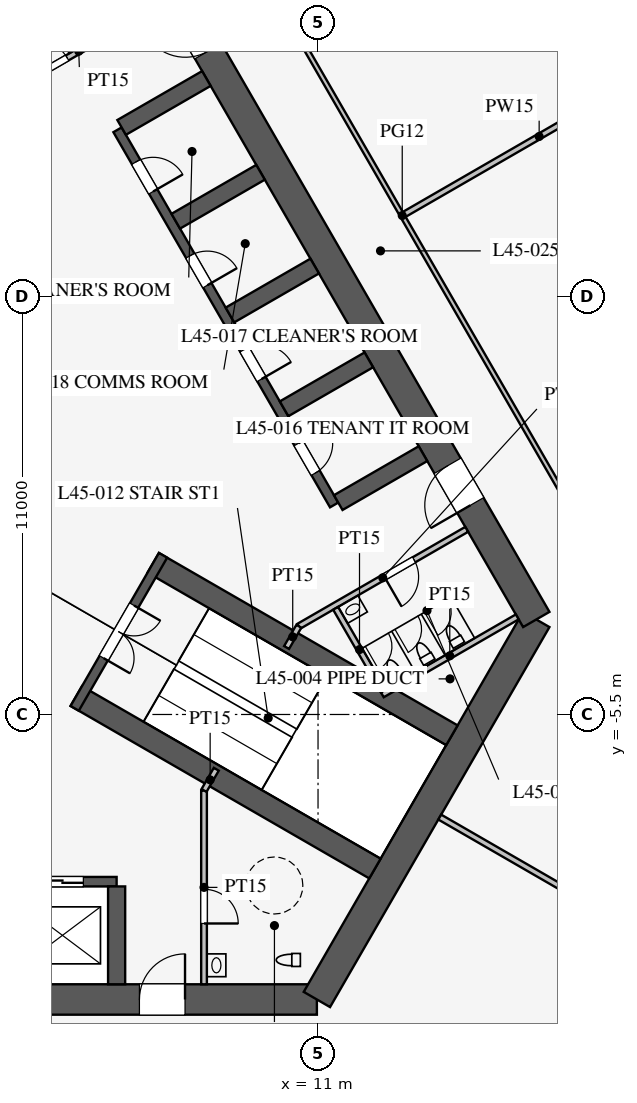
"""IFC4 building model, lengths in metres.
Left out: names, types, materials, properties, quantities, classifications, styles, units other than length and angle.
Written with IfcOpenShell. Run it as: python <this file> out.ifc"""

import sys

from ifc_helpers import new_model, si_unit, direction, frame, frame_2d, origin, place, context, subcontext, project, spatial, rectangle, extrude, element, fill, save


model = new_model("IFC4")
c1 = context("Model", 3, precision=1e-05, world=origin(), true_north=direction((0.0, 1.0)))
c2 = subcontext(c1, "Body", "Model", "MODEL_VIEW")
j1 = project(units=[si_unit("LENGTHUNIT", "METRE"), si_unit("PLANEANGLEUNIT", "RADIAN")], contexts=[c1])
p1 = place(None, origin())
s1 = spatial("IfcSite", under=j1, at=p1, CompositionType="ELEMENT")
p2 = place(p1, origin())
s2 = spatial("IfcBuilding", under=s1, at=p2, CompositionType="ELEMENT")
p3 = place(p2, frame((0.0, 0.0, 198.1)))
s3 = spatial("IfcBuildingStorey", under=s2, at=p3, CompositionType="ELEMENT", Elevation=198.1)
p4 = place(p3, frame((-10.97, -13.0, 0.0), z_axis=(0.0, 0.0, 1.0), x_axis=(1.0, 0.0, 0.0)))
e1 = element("IfcWall", 1, at=p4, inside=s3, PredefinedType="SHEAR", context=c2, shape_type="SweptSolid", body=[
    extrude(rectangle(XDim=21.939, YDim=0.8, at=frame_2d((10.97, 0.0))), origin(), (0.0, 0.0, 1.0), 4.2),
])
p5 = place(p4, frame((17.27, 0.0, 0.0)))
e2 = element("IfcOpeningElement", 2, at=p5, cuts=e1, PredefinedType="OPENING", context=c2, shape_type="SweptSolid", body=[
    extrude(rectangle(XDim=1.2, YDim=2.1, at=frame_2d((0.6, 1.05))), frame((0.0, 0.41, 0.0), z_axis=(0.0, -1.0, 0.0), x_axis=(1.0, 0.0, 0.0)), (0.0, 0.0, 1.0), 0.82),
])
p6 = place(p4, frame((3.47, 0.0, 0.0)))
e3 = element("IfcOpeningElement", 3, at=p6, cuts=e1, PredefinedType="OPENING", context=c2, shape_type="SweptSolid", body=[
    extrude(rectangle(XDim=1.2, YDim=2.1, at=frame_2d((0.6, 1.05))), frame((0.0, 0.41, 0.0), z_axis=(0.0, -1.0, 0.0), x_axis=(1.0, 0.0, 0.0)), (0.0, 0.0, 1.0), 0.82),
])
p7 = place(p3, frame((10.97, -13.0, 0.0), z_axis=(0.0, 0.0, 1.0), x_axis=(0.499995765644, 0.866027848477, 0.0)))
e4 = element("IfcWall", 4, at=p7, inside=s3, PredefinedType="SHEAR", context=c2, shape_type="SweptSolid", body=[
    extrude(rectangle(XDim=11.547, YDim=0.8, at=frame_2d((5.773, 0.0))), origin(), (0.0, 0.0, 1.0), 4.2),
])
p8 = place(p3, frame((16.743, -3.0, 0.0), z_axis=(0.0, 0.0, 1.0), x_axis=(-0.500002442456, 0.866023993627, 0.0)))
e5 = element("IfcWall", 5, at=p8, inside=s3, PredefinedType="SHEAR", context=c2, shape_type="SweptSolid", body=[
    extrude(rectangle(XDim=21.939, YDim=0.8, at=frame_2d((10.97, 0.0))), origin(), (0.0, 0.0, 1.0), 4.2),
])
p9 = place(p8, frame((17.27, 0.0, 0.0)))
e6 = element("IfcOpeningElement", 6, at=p9, cuts=e5, PredefinedType="OPENING", context=c2, shape_type="SweptSolid", body=[
    extrude(rectangle(XDim=1.2, YDim=2.1, at=frame_2d((0.6, 1.05))), frame((0.0, 0.41, 0.0), z_axis=(0.0, -1.0, 0.0), x_axis=(1.0, 0.0, 0.0)), (0.0, 0.0, 1.0), 0.82),
])
p10 = place(p8, frame((3.47, 0.0, 0.0)))
e7 = element("IfcOpeningElement", 7, at=p10, cuts=e5, PredefinedType="OPENING", context=c2, shape_type="SweptSolid", body=[
    extrude(rectangle(XDim=1.2, YDim=2.1, at=frame_2d((0.6, 1.05))), frame((0.0, 0.41, 0.0), z_axis=(0.0, -1.0, 0.0), x_axis=(1.0, 0.0, 0.0)), (0.0, 0.0, 1.0), 0.82),
])
p11 = place(p3, frame((-5.7, -9.9, 0.0), z_axis=(0.0, 0.0, 1.0), x_axis=(1.0, 0.0, 0.0)))
e8 = element("IfcWall", 8, at=p11, inside=s3, PredefinedType="SHEAR", context=c2, shape_type="SweptSolid", body=[
    extrude(rectangle(XDim=11.4, YDim=0.25, at=frame_2d((5.7, 0.0))), origin(), (0.0, 0.0, 1.0), 4.2),
])
p12 = place(p11, frame((0.875, 0.0, 0.0)))
e9 = element("IfcOpeningElement", 9, at=p12, cuts=e8, PredefinedType="OPENING", context=c2, shape_type="SweptSolid", body=[
    extrude(rectangle(XDim=1.1, YDim=2.2, at=frame_2d((0.55, 1.1))), frame((0.0, 0.135, 0.0), z_axis=(0.0, -1.0, 0.0), x_axis=(1.0, 0.0, 0.0)), (0.0, 0.0, 1.0), 0.27),
])
p13 = place(p11, frame((3.725, 0.0, 0.0)))
e10 = element("IfcOpeningElement", 10, at=p13, cuts=e8, PredefinedType="OPENING", context=c2, shape_type="SweptSolid", body=[
    extrude(rectangle(XDim=1.1, YDim=2.2, at=frame_2d((0.55, 1.1))), frame((0.0, 0.135, 0.0), z_axis=(0.0, -1.0, 0.0), x_axis=(1.0, 0.0, 0.0)), (0.0, 0.0, 1.0), 0.27),
])
p14 = place(p11, frame((6.575, 0.0, 0.0)))
e11 = element("IfcOpeningElement", 11, at=p14, cuts=e8, PredefinedType="OPENING", context=c2, shape_type="SweptSolid", body=[
    extrude(rectangle(XDim=1.1, YDim=2.2, at=frame_2d((0.55, 1.1))), frame((0.0, 0.135, 0.0), z_axis=(0.0, -1.0, 0.0), x_axis=(1.0, 0.0, 0.0)), (0.0, 0.0, 1.0), 0.27),
])
p15 = place(p11, frame((9.425, 0.0, 0.0)))
e12 = element("IfcOpeningElement", 12, at=p15, cuts=e8, PredefinedType="OPENING", context=c2, shape_type="SweptSolid", body=[
    extrude(rectangle(XDim=1.1, YDim=2.2, at=frame_2d((0.55, 1.1))), frame((0.0, 0.135, 0.0), z_axis=(0.0, -1.0, 0.0), x_axis=(1.0, 0.0, 0.0)), (0.0, 0.0, 1.0), 0.27),
])
p16 = place(p3, frame((5.7, -10.025, 0.0), z_axis=(0.0, 0.0, 1.0), x_axis=(0.0, -1.0, 0.0)))
e13 = element("IfcWall", 13, at=p16, inside=s3, PredefinedType="SHEAR", context=c2, shape_type="SweptSolid", body=[
    extrude(rectangle(XDim=2.575, YDim=0.45, at=frame_2d((1.288, 0.0))), origin(), (0.0, 0.0, 1.0), 4.2),
])
p17 = place(p3, frame((11.424, 0.014, 0.0), z_axis=(0.0, 0.0, 1.0), x_axis=(-0.500001763848, 0.866024385424, 0.0)))
e14 = element("IfcWall", 14, at=p17, inside=s3, PredefinedType="SHEAR", context=c2, shape_type="SweptSolid", body=[
    extrude(rectangle(XDim=11.4, YDim=0.25, at=frame_2d((5.7, 0.0))), origin(), (0.0, 0.0, 1.0), 4.2),
])
p18 = place(p17, frame((0.975, 0.0, 0.0)))
e15 = element("IfcOpeningElement", 15, at=p18, cuts=e14, PredefinedType="OPENING", context=c2, shape_type="SweptSolid", body=[
    extrude(rectangle(XDim=0.9, YDim=2.1, at=frame_2d((0.45, 1.05))), frame((0.0, 0.135, 0.0), z_axis=(0.0, -1.0, 0.0), x_axis=(1.0, 0.0, 0.0)), (0.0, 0.0, 1.0), 0.27),
])
p19 = place(p17, frame((3.825, 0.0, 0.0)))
e16 = element("IfcOpeningElement", 16, at=p19, cuts=e14, PredefinedType="OPENING", context=c2, shape_type="SweptSolid", body=[
    extrude(rectangle(XDim=0.9, YDim=2.1, at=frame_2d((0.45, 1.05))), frame((0.0, 0.135, 0.0), z_axis=(0.0, -1.0, 0.0), x_axis=(1.0, 0.0, 0.0)), (0.0, 0.0, 1.0), 0.27),
])
p20 = place(p17, frame((6.675, 0.0, 0.0)))
e17 = element("IfcOpeningElement", 17, at=p20, cuts=e14, PredefinedType="OPENING", context=c2, shape_type="SweptSolid", body=[
    extrude(rectangle(XDim=0.9, YDim=2.1, at=frame_2d((0.45, 1.05))), frame((0.0, 0.135, 0.0), z_axis=(0.0, -1.0, 0.0), x_axis=(1.0, 0.0, 0.0)), (0.0, 0.0, 1.0), 0.27),
])
p21 = place(p17, frame((9.525, 0.0, 0.0)))
e18 = element("IfcOpeningElement", 18, at=p21, cuts=e14, PredefinedType="OPENING", context=c2, shape_type="SweptSolid", body=[
    extrude(rectangle(XDim=0.9, YDim=2.1, at=frame_2d((0.45, 1.05))), frame((0.0, 0.135, 0.0), z_axis=(0.0, -1.0, 0.0), x_axis=(1.0, 0.0, 0.0)), (0.0, 0.0, 1.0), 0.27),
])
for number, where, z_axis, x_axis in (
    (19, (11.532, 0.076, 0.0), (0.0, 0.0, 1.0), (0.866, 0.5, 0.0)),
    (20, (10.107, 2.544, 0.0), (0.0, 0.0, 1.0), (0.866, 0.5, 0.0)),
    (21, (8.682, 5.012, 0.0), (0.0, 0.0, 1.0), (0.866, 0.5, 0.0)),
    (22, (7.257, 7.481, 0.0), (0.0, 0.0, 1.0), (0.866, 0.5, 0.0)),
):
    element("IfcWall", number, at=place(p3, frame(where, z_axis=z_axis, x_axis=x_axis)), inside=s3, PredefinedType="SHEAR", context=c2, shape_type="SweptSolid", body=[
        extrude(rectangle(XDim=2.575, YDim=0.45, at=frame_2d((1.288, 0.0))), origin(), (0.0, 0.0, 1.0), 4.2),
    ])
p22 = place(p3, frame((5.832, 9.949, 0.0), z_axis=(0.0, 0.0, 1.0), x_axis=(0.866029291668, 0.499993265928, 0.0)))
e23 = element("IfcWall", 23, at=p22, inside=s3, PredefinedType="SHEAR", context=c2, shape_type="SweptSolid", body=[
    extrude(rectangle(XDim=2.575, YDim=0.45, at=frame_2d((1.288, 0.0))), origin(), (0.0, 0.0, 1.0), 4.2),
])
for number, where, z_axis, x_axis in (
    (24, (4.638, -5.016, 0.0), (0.0, 0.0, 1.0), (0.866, -0.5, 0.0)),
    (25, (6.663, -1.509, 0.0), (0.0, 0.0, 1.0), (0.866, -0.5, 0.0)),
):
    element("IfcWall", number, at=place(p3, frame(where, z_axis=z_axis, x_axis=x_axis)), inside=s3, PredefinedType="SHEAR", context=c2, shape_type="SweptSolid", body=[
        extrude(rectangle(XDim=9.075, YDim=0.6, at=frame_2d((4.538, 0.0))), origin(), (0.0, 0.0, 1.0), 4.2),
    ])
p23 = place(p3, frame((4.597, -5.339, 0.0), z_axis=(0.0, 0.0, 1.0), x_axis=(0.499984536904, 0.866034331223, 0.0)))
e26 = element("IfcWall", 26, at=p23, inside=s3, PredefinedType="SHEAR", context=c2, shape_type="SweptSolid", body=[
    extrude(rectangle(XDim=4.65, YDim=0.25, at=frame_2d((2.325, 0.0))), origin(), (0.0, 0.0, 1.0), 4.2),
])
p24 = place(p23, frame((1.525, 0.0, 0.0)))
e27 = element("IfcOpeningElement", 27, at=p24, cuts=e26, PredefinedType="OPENING", context=c2, shape_type="SweptSolid", body=[
    extrude(rectangle(XDim=1.6, YDim=2.1, at=frame_2d((0.8, 1.05))), frame((0.0, 0.135, 0.0), z_axis=(0.0, -1.0, 0.0), x_axis=(1.0, 0.0, 0.0)), (0.0, 0.0, 1.0), 0.27),
])
p25 = place(p3, frame((8.0, -7.5, 0.0), z_axis=(0.0, 0.0, 1.0), x_axis=(0.0, -1.0, 0.0)))
e28 = element("IfcWall", 28, at=p25, inside=s3, PredefinedType="PARTITIONING", context=c2, shape_type="SweptSolid", body=[
    extrude(rectangle(XDim=5.1, YDim=0.15, at=frame_2d((2.55, 0.0))), origin(), (0.0, 0.0, 1.0), 4.0),
])
p26 = place(p25, frame((2.6, 0.0, 0.0)))
e29 = element("IfcOpeningElement", 29, at=p26, cuts=e28, PredefinedType="OPENING", context=c2, shape_type="SweptSolid", body=[
    extrude(rectangle(XDim=0.9, YDim=2.1, at=frame_2d((0.45, 1.05))), frame((0.0, 0.085, 0.0), z_axis=(0.0, -1.0, 0.0), x_axis=(1.0, 0.0, 0.0)), (0.0, 0.0, 1.0), 0.17),
])
p27 = place(p3, frame((2.495, 10.678, 0.0), z_axis=(0.0, 0.0, 1.0), x_axis=(0.86602216432, 0.500005610874, 0.0)))
e30 = element("IfcWall", 30, at=p27, inside=s3, PredefinedType="PARTITIONING", context=c2, shape_type="SweptSolid", body=[
    extrude(rectangle(XDim=5.1, YDim=0.15, at=frame_2d((2.55, 0.0))), origin(), (0.0, 0.0, 1.0), 4.0),
])
p28 = place(p27, frame((1.3, 0.0, 0.0)))
e31 = element("IfcOpeningElement", 31, at=p28, cuts=e30, PredefinedType="OPENING", context=c2, shape_type="SweptSolid", body=[
    extrude(rectangle(XDim=0.9, YDim=2.1, at=frame_2d((0.45, 1.05))), frame((0.0, 0.085, 0.0), z_axis=(0.0, -1.0, 0.0), x_axis=(1.0, 0.0, 0.0)), (0.0, 0.0, 1.0), 0.17),
])
p29 = place(p3, frame((10.495, -3.178, 0.0), z_axis=(0.0, 0.0, 1.0), x_axis=(0.86602216432, 0.500005610874, 0.0)))
e32 = element("IfcWall", 32, at=p29, inside=s3, PredefinedType="PARTITIONING", context=c2, shape_type="SweptSolid", body=[
    extrude(rectangle(XDim=5.1, YDim=0.15, at=frame_2d((2.55, 0.0))), origin(), (0.0, 0.0, 1.0), 4.0),
])
p30 = place(p29, frame((2.6, 0.0, 0.0)))
e33 = element("IfcOpeningElement", 33, at=p30, cuts=e32, PredefinedType="OPENING", context=c2, shape_type="SweptSolid", body=[
    extrude(rectangle(XDim=0.9, YDim=2.1, at=frame_2d((0.45, 1.05))), frame((0.0, 0.085, 0.0), z_axis=(0.0, -1.0, 0.0), x_axis=(1.0, 0.0, 0.0)), (0.0, 0.0, 1.0), 0.17),
])
for number, where, z_axis, x_axis in (
    (34, (8.0, -7.5, 0.0), (0.0, 0.0, 1.0), (0.5, 0.866, 0.0)),
    (35, (10.495, -3.178, 0.0), (0.0, 0.0, 1.0), (-0.5, -0.866, 0.0)),
):
    element("IfcWall", number, at=place(p3, frame(where, z_axis=z_axis, x_axis=x_axis)), inside=s3, PredefinedType="PARTITIONING", context=c2, shape_type="SweptSolid", body=[
        extrude(rectangle(XDim=0.645, YDim=0.15, at=frame_2d((0.323, 0.0))), origin(), (0.0, 0.0, 1.0), 4.0),
    ])
p31 = place(p3, frame((12.691, -4.982, 0.0), z_axis=(0.0, 0.0, 1.0), x_axis=(0.8660249478, 0.500000789788, 0.0)))
e36 = element("IfcWall", 36, at=p31, inside=s3, PredefinedType="PARTITIONING", context=c2, shape_type="SweptSolid", body=[
    extrude(rectangle(XDim=4.1, YDim=0.15, at=frame_2d((2.05, 0.0))), origin(), (0.0, 0.0, 1.0), 4.0),
])
p32 = place(p3, frame((11.464, -2.706, 0.0), z_axis=(0.0, 0.0, 1.0), x_axis=(0.50001992892, -0.866013897511, 0.0)))
e37 = element("IfcWall", 37, at=p32, inside=s3, PredefinedType="PARTITIONING", context=c2, shape_type="SweptSolid", body=[
    extrude(rectangle(XDim=2.51, YDim=0.15, at=frame_2d((1.255, 0.0))), origin(), (0.0, 0.0, 1.0), 4.0),
])
p33 = place(p3, frame((14.203, -8.2, 0.0), z_axis=(0.0, 0.0, 1.0), x_axis=(0.866021600284, -0.500006587798, 0.0)))
e38 = element("IfcWall", 38, at=p33, inside=s3, PredefinedType="PARTITIONING", context=c2, shape_type="SweptSolid", body=[
    extrude(rectangle(XDim=14.95, YDim=0.15, at=frame_2d((7.475, 0.0))), origin(), (0.0, 0.0, 1.0), 2.4),
])
p34 = place(p3, frame((13.268, 7.66, 0.0), z_axis=(0.0, 0.0, 1.0), x_axis=(0.866019499219, 0.500010226868, 0.0)))
e39 = element("IfcWall", 39, at=p34, inside=s3, PredefinedType="PARTITIONING", context=c2, shape_type="SweptSolid", body=[
    extrude(rectangle(XDim=8.2, YDim=0.15, at=frame_2d((4.1, 0.0))), origin(), (0.0, 0.0, 1.0), 2.992),
])
p35 = place(p3, frame((26.415, -15.231, 0.0), z_axis=(0.0, 0.0, 1.0), x_axis=(-0.50000091641, 0.866024874695, 0.0)))
e40 = element("IfcWall", 40, at=p35, inside=s3, PredefinedType="PARTITIONING", context=c2, shape_type="SweptSolid", body=[
    extrude(rectangle(XDim=52.796, YDim=0.12, at=frame_2d((26.398, 0.0))), origin(), (0.0, 0.0, 1.0), 2.9),
])
p36 = place(p35, frame((10.2, 0.0, 0.15)))
e41 = element("IfcOpeningElement", 41, at=p36, cuts=e40, PredefinedType="OPENING", context=c2, shape_type="SweptSolid", body=[
    extrude(rectangle(XDim=1.8, YDim=2.1, at=frame_2d((0.9, 1.05))), frame((0.0, 0.07, 0.0), z_axis=(0.0, -1.0, 0.0), x_axis=(1.0, 0.0, 0.0)), (0.0, 0.0, 1.0), 0.14),
])
p37 = place(p35, frame((40.8, 0.0, 0.15)))
e42 = element("IfcOpeningElement", 42, at=p37, cuts=e40, PredefinedType="OPENING", context=c2, shape_type="SweptSolid", body=[
    extrude(rectangle(XDim=1.8, YDim=2.1, at=frame_2d((0.9, 1.05))), frame((0.0, 0.07, 0.0), z_axis=(0.0, -1.0, 0.0), x_axis=(1.0, 0.0, 0.0)), (0.0, 0.0, 1.0), 0.14),
])
p38 = place(p26, origin())
e43 = element("IfcDoor", 43, at=p38, inside=s3, OperationType="SINGLE_SWING_RIGHT", PredefinedType="DOOR", context=c2, shape_type="SweptSolid", body=[
    extrude(rectangle(XDim=0.9, YDim=2.1, at=frame_2d((0.45, 1.05))), frame((0.0, 0.025, 0.0), z_axis=(0.0, -1.0, 0.0), x_axis=(1.0, 0.0, 0.0)), (0.0, 0.0, 1.0), 0.05),
])
fill(e29, e43)
p39 = place(p28, origin())
e44 = element("IfcDoor", 44, at=p39, inside=s3, OperationType="SINGLE_SWING_LEFT", PredefinedType="DOOR", context=c2, shape_type="SweptSolid", body=[
    extrude(rectangle(XDim=0.9, YDim=2.1, at=frame_2d((0.45, 1.05))), frame((0.0, 0.025, 0.0), z_axis=(0.0, -1.0, 0.0), x_axis=(1.0, 0.0, 0.0)), (0.0, 0.0, 1.0), 0.05),
])
fill(e31, e44)
p40 = place(p30, frame((0.9, 0.0, 0.0), z_axis=(0.0, 0.0, 1.0), x_axis=(-1.0, 0.0, 0.0)))
e45 = element("IfcDoor", 45, at=p40, inside=s3, OperationType="SINGLE_SWING_RIGHT", PredefinedType="DOOR", context=c2, shape_type="SweptSolid", body=[
    extrude(rectangle(XDim=0.9, YDim=2.1, at=frame_2d((0.45, 1.05))), frame((0.0, 0.025, 0.0), z_axis=(0.0, -1.0, 0.0), x_axis=(1.0, 0.0, 0.0)), (0.0, 0.0, 1.0), 0.05),
])
fill(e33, e45)
p41 = place(p24, frame((1.6, 0.0, 0.0), z_axis=(0.0, 0.0, 1.0), x_axis=(-1.0, 0.0, 0.0)))
e46 = element("IfcDoor", 46, at=p41, inside=s3, OperationType="DOUBLE_DOOR_SINGLE_SWING", PredefinedType="DOOR", context=c2, shape_type="SweptSolid", body=[
    extrude(rectangle(XDim=1.6, YDim=2.1, at=frame_2d((0.8, 1.05))), frame((0.0, 0.025, 0.0), z_axis=(0.0, -1.0, 0.0), x_axis=(1.0, 0.0, 0.0)), (0.0, 0.0, 1.0), 0.05),
])
fill(e27, e46)
p42 = place(p5, origin())
e47 = element("IfcDoor", 47, at=p42, inside=s3, OperationType="SINGLE_SWING_RIGHT", PredefinedType="DOOR", context=c2, shape_type="SweptSolid", body=[
    extrude(rectangle(XDim=1.2, YDim=2.1, at=frame_2d((0.6, 1.05))), frame((0.0, 0.025, 0.0), z_axis=(0.0, -1.0, 0.0), x_axis=(1.0, 0.0, 0.0)), (0.0, 0.0, 1.0), 0.05),
])
fill(e2, e47)
p43 = place(p9, origin())
e48 = element("IfcDoor", 48, at=p43, inside=s3, OperationType="SINGLE_SWING_RIGHT", PredefinedType="DOOR", context=c2, shape_type="SweptSolid", body=[
    extrude(rectangle(XDim=1.2, YDim=2.1, at=frame_2d((0.6, 1.05))), frame((0.0, 0.025, 0.0), z_axis=(0.0, -1.0, 0.0), x_axis=(1.0, 0.0, 0.0)), (0.0, 0.0, 1.0), 0.05),
])
fill(e6, e48)
p44 = place(p10, origin())
e49 = element("IfcDoor", 49, at=p44, inside=s3, OperationType="SINGLE_SWING_LEFT", PredefinedType="DOOR", context=c2, shape_type="SweptSolid", body=[
    extrude(rectangle(XDim=1.2, YDim=2.1, at=frame_2d((0.6, 1.05))), frame((0.0, 0.025, 0.0), z_axis=(0.0, -1.0, 0.0), x_axis=(1.0, 0.0, 0.0)), (0.0, 0.0, 1.0), 0.05),
])
fill(e7, e49)
p45 = place(p18, frame((0.9, 0.0, 0.0), z_axis=(0.0, 0.0, 1.0), x_axis=(-1.0, 0.0, 0.0)))
e50 = element("IfcDoor", 50, at=p45, inside=s3, OperationType="SINGLE_SWING_LEFT", PredefinedType="DOOR", context=c2, shape_type="SweptSolid", body=[
    extrude(rectangle(XDim=0.9, YDim=2.1, at=frame_2d((0.45, 1.05))), frame((0.0, 0.025, 0.0), z_axis=(0.0, -1.0, 0.0), x_axis=(1.0, 0.0, 0.0)), (0.0, 0.0, 1.0), 0.05),
])
fill(e15, e50)
p46 = place(p19, frame((0.9, 0.0, 0.0), z_axis=(0.0, 0.0, 1.0), x_axis=(-1.0, 0.0, 0.0)))
e51 = element("IfcDoor", 51, at=p46, inside=s3, OperationType="SINGLE_SWING_RIGHT", PredefinedType="DOOR", context=c2, shape_type="SweptSolid", body=[
    extrude(rectangle(XDim=0.9, YDim=2.1, at=frame_2d((0.45, 1.05))), frame((0.0, 0.025, 0.0), z_axis=(0.0, -1.0, 0.0), x_axis=(1.0, 0.0, 0.0)), (0.0, 0.0, 1.0), 0.05),
])
fill(e16, e51)
p47 = place(p20, frame((0.9, 0.0, 0.0), z_axis=(0.0, 0.0, 1.0), x_axis=(-1.0, 0.0, 0.0)))
e52 = element("IfcDoor", 52, at=p47, inside=s3, OperationType="SINGLE_SWING_RIGHT", PredefinedType="DOOR", context=c2, shape_type="SweptSolid", body=[
    extrude(rectangle(XDim=0.9, YDim=2.1, at=frame_2d((0.45, 1.05))), frame((0.0, 0.025, 0.0), z_axis=(0.0, -1.0, 0.0), x_axis=(1.0, 0.0, 0.0)), (0.0, 0.0, 1.0), 0.05),
])
fill(e17, e52)
p48 = place(p21, frame((0.9, 0.0, 0.0), z_axis=(0.0, 0.0, 1.0), x_axis=(-1.0, 0.0, 0.0)))
e53 = element("IfcDoor", 53, at=p48, inside=s3, OperationType="SINGLE_SWING_RIGHT", PredefinedType="DOOR", context=c2, shape_type="SweptSolid", body=[
    extrude(rectangle(XDim=0.9, YDim=2.1, at=frame_2d((0.45, 1.05))), frame((0.0, 0.025, 0.0), z_axis=(0.0, -1.0, 0.0), x_axis=(1.0, 0.0, 0.0)), (0.0, 0.0, 1.0), 0.05),
])
fill(e18, e53)
p49 = place(p15, origin())
e54 = element("IfcDoor", 54, at=p49, inside=s3, OperationType="DOUBLE_DOOR_SLIDING", PredefinedType="DOOR", context=c2, shape_type="SweptSolid", body=[
    extrude(rectangle(XDim=1.1, YDim=2.2, at=frame_2d((0.55, 1.1))), frame((0.0, 0.025, 0.0), z_axis=(0.0, -1.0, 0.0), x_axis=(1.0, 0.0, 0.0)), (0.0, 0.0, 1.0), 0.05),
])
fill(e12, e54)
save(model, sys.argv[1])
